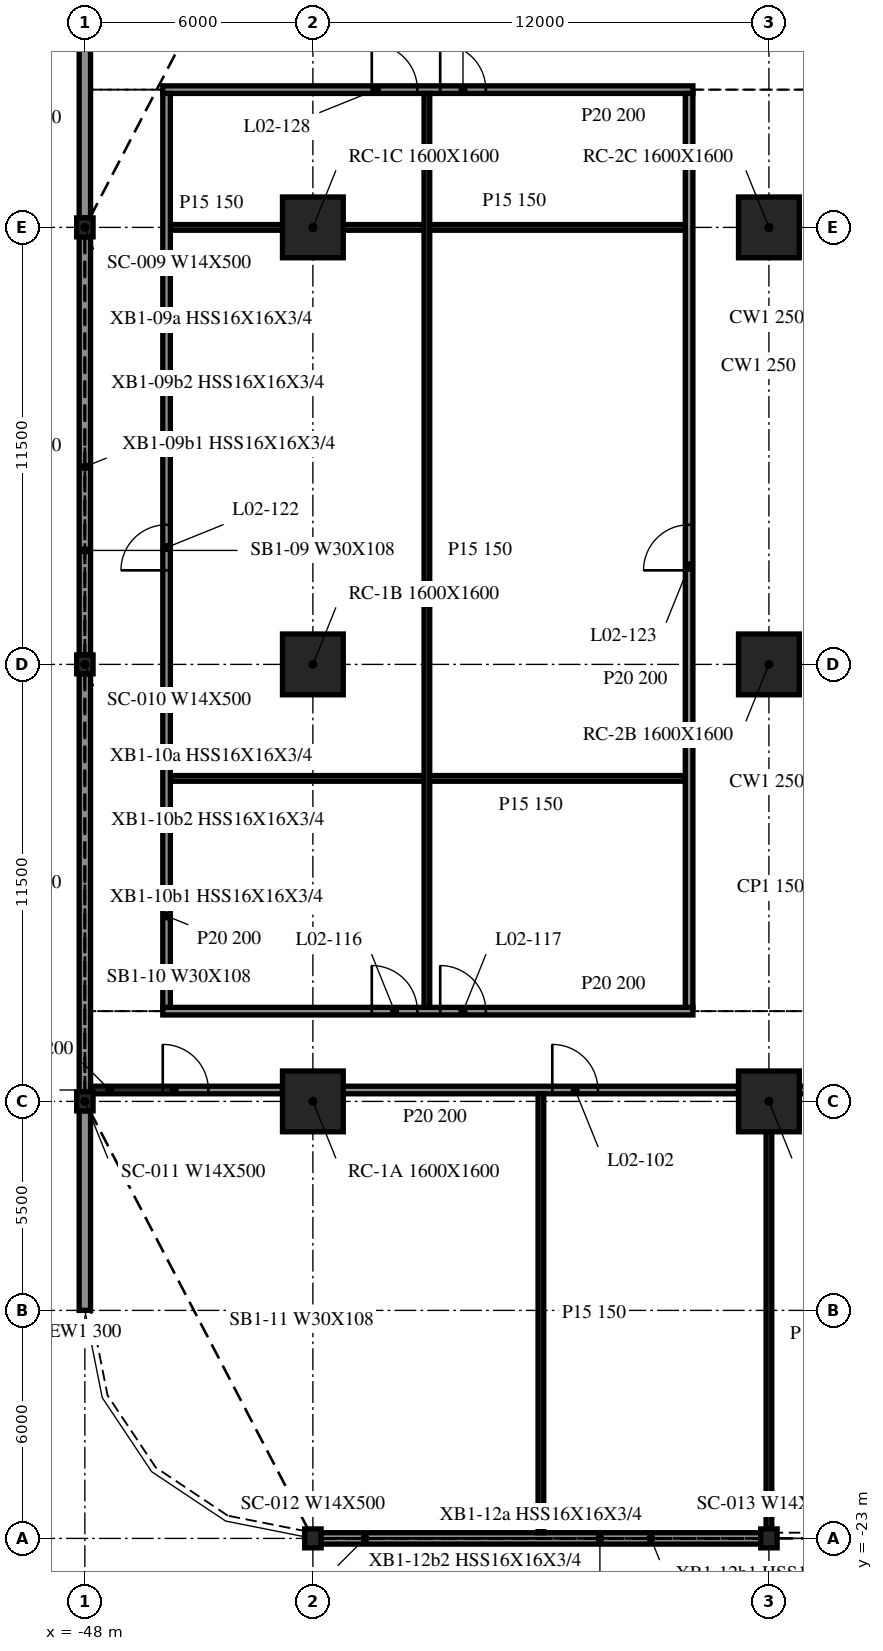
"""IFC4 building model, lengths in metres.
Left out: names, types, materials, properties, quantities, classifications, styles, units other than length and angle.
Written with IfcOpenShell. Run it as: python <this file> out.ifc"""

import sys

from ifc_helpers import new_model, si_unit, direction, frame, frame_2d, origin, origin_2d, place, context, subcontext, project, spatial, rectangle, i_section, extrude, element, fill, save


model = new_model("IFC4")
c1 = context("Model", 3, precision=1e-05, world=origin(), true_north=direction((0.0, 1.0)))
c2 = subcontext(c1, "Body", "Model", "MODEL_VIEW")
j1 = project(units=[si_unit("LENGTHUNIT", "METRE"), si_unit("PLANEANGLEUNIT", "RADIAN")], contexts=[c1])
p1 = place(None, origin())
s1 = spatial("IfcSite", under=j1, at=p1, CompositionType="ELEMENT")
p2 = place(p1, origin())
s2 = spatial("IfcBuilding", under=s1, at=p2, CompositionType="ELEMENT")
p3 = place(p2, frame((0.0, 0.0, 11.5)))
s3 = spatial("IfcBuildingStorey", under=s2, at=p3, CompositionType="ELEMENT", Elevation=11.5)
for number, where, z_axis, x_axis in (
    (1, (-42.0, -11.5, -0.34), (0.0, 0.0, 1.0), (1.0, 0.0, 0.0)),
    (2, (-42.0, 0.0, -0.34), (0.0, 0.0, 1.0), (1.0, 0.0, 0.0)),
    (3, (-42.0, 11.5, -0.34), (0.0, 0.0, 1.0), (1.0, 0.0, 0.0)),
    (4, (-30.0, -11.5, -0.34), (0.0, 0.0, 1.0), (1.0, 0.0, 0.0)),
    (5, (-30.0, 0.0, -0.34), (0.0, 0.0, 1.0), (1.0, 0.0, 0.0)),
    (6, (-30.0, 11.5, -0.34), (0.0, 0.0, 1.0), (1.0, 0.0, 0.0)),
):
    element("IfcColumn", number, at=place(p3, frame(where, z_axis=z_axis, x_axis=x_axis)), inside=s3, PredefinedType="COLUMN", context=c2, shape_type="SweptSolid", body=[
        extrude(rectangle(XDim=1.6, YDim=1.6, at=origin_2d()), origin(), (0.0, 0.0, 1.0), 4.3),
    ])
for number, where, z_axis, x_axis in (
    (7, (-48.0, 11.5, -0.34), (0.0, 0.0, 1.0), (1.0, 0.0, 0.0)),
    (8, (-48.0, 0.0, -0.34), (0.0, 0.0, 1.0), (1.0, 0.0, 0.0)),
    (9, (-48.0, -11.5, -0.34), (0.0, 0.0, 1.0), (1.0, 0.0, 0.0)),
    (10, (-42.0, -23.0, -0.34), (0.0, 0.0, 1.0), (1.0, 0.0, 0.0)),
    (11, (-30.0, -23.0, -0.34), (0.0, 0.0, 1.0), (1.0, 0.0, 0.0)),
):
    element("IfcColumn", number, at=place(p3, frame(where, z_axis=z_axis, x_axis=x_axis)), inside=s3, PredefinedType="COLUMN", context=c2, shape_type="SweptSolid", body=[
        extrude(i_section(OverallWidth=0.432, OverallDepth=0.498, WebThickness=0.056, FlangeThickness=0.089, at=origin_2d()), origin(), (0.0, 0.0, 1.0), 4.3),
    ])
p4 = place(p3, frame((-48.0, 17.0, 0.0), z_axis=(0.0, 0.0, 1.0), x_axis=(0.0, -1.0, 0.0)))
e12 = element("IfcWall", 12, at=p4, inside=s3, PredefinedType="NOTDEFINED", context=c2, shape_type="SweptSolid", body=[
    extrude(rectangle(XDim=5.251, YDim=0.3, at=frame_2d((2.625, 0.0))), origin(), (0.0, 0.0, 1.0), 3.203),
])
for number, where, z_axis, x_axis in (
    (13, (-48.0, 11.251, 0.0), (0.0, 0.0, 1.0), (0.0, -1.0, 0.0)),
    (14, (-48.0, -0.249, 0.0), (0.0, 0.0, 1.0), (0.0, -1.0, 0.0)),
):
    element("IfcWall", number, at=place(p3, frame(where, z_axis=z_axis, x_axis=x_axis)), inside=s3, PredefinedType="NOTDEFINED", context=c2, shape_type="SweptSolid", body=[
        extrude(rectangle(XDim=11.002, YDim=0.3, at=frame_2d((5.501, 0.0))), origin(), (0.0, 0.0, 1.0), 3.203),
    ])
p5 = place(p3, frame((-48.0, -11.749, 0.0), z_axis=(0.0, 0.0, 1.0), x_axis=(0.0, -1.0, 0.0)))
e15 = element("IfcWall", 15, at=p5, inside=s3, PredefinedType="NOTDEFINED", context=c2, shape_type="SweptSolid", body=[
    extrude(rectangle(XDim=5.251, YDim=0.3, at=frame_2d((2.625, 0.0))), origin(), (0.0, 0.0, 1.0), 3.203),
])
p6 = place(p3, frame((-41.972, -23.0, 0.0), z_axis=(0.0, 0.0, 1.0), x_axis=(1.0, 0.0, 0.0)))
e16 = element("IfcWall", 16, at=p6, inside=s3, PredefinedType="NOTDEFINED", context=c2, shape_type="SweptSolid", body=[
    extrude(rectangle(XDim=11.944, YDim=0.3, at=frame_2d((5.972, 0.0))), origin(), (0.0, 0.0, 1.0), 3.203),
])
p7 = place(p3, frame((-47.85, -11.2, 0.0), z_axis=(0.0, 0.0, 1.0), x_axis=(1.0, 0.0, 0.0)))
e17 = element("IfcWall", 17, at=p7, inside=s3, PredefinedType="PARTITIONING", context=c2, shape_type="SweptSolid", body=[
    extrude(rectangle(XDim=5.05, YDim=0.2, at=frame_2d((2.525, 0.0))), origin(), (0.0, 0.0, 1.0), 3.96),
])
p8 = place(p7, frame((1.9, 0.0, 0.0)))
e18 = element("IfcOpeningElement", 18, at=p8, cuts=e17, PredefinedType="OPENING", context=c2, shape_type="SweptSolid", body=[
    extrude(rectangle(XDim=1.2, YDim=2.1, at=frame_2d((0.6, 1.05))), frame((0.0, 0.11, 0.0), z_axis=(0.0, -1.0, 0.0), x_axis=(1.0, 0.0, 0.0)), (0.0, 0.0, 1.0), 0.22),
])
p9 = place(p3, frame((-41.2, -11.2, 0.0), z_axis=(0.0, 0.0, 1.0), x_axis=(1.0, 0.0, 0.0)))
e19 = element("IfcWall", 19, at=p9, inside=s3, PredefinedType="PARTITIONING", context=c2, shape_type="SweptSolid", body=[
    extrude(rectangle(XDim=10.4, YDim=0.2, at=frame_2d((5.2, 0.0))), origin(), (0.0, 0.0, 1.0), 3.96),
])
p10 = place(p9, frame((5.5, 0.0, 0.0)))
e20 = element("IfcOpeningElement", 20, at=p10, cuts=e19, PredefinedType="OPENING", context=c2, shape_type="SweptSolid", body=[
    extrude(rectangle(XDim=1.2, YDim=2.1, at=frame_2d((0.6, 1.05))), frame((0.0, 0.11, 0.0), z_axis=(0.0, -1.0, 0.0), x_axis=(1.0, 0.0, 0.0)), (0.0, 0.0, 1.0), 0.22),
])
p11 = place(p3, frame((-29.2, -11.2, 0.0), z_axis=(0.0, 0.0, 1.0), x_axis=(1.0, 0.0, 0.0)))
e21 = element("IfcWall", 21, at=p11, inside=s3, PredefinedType="PARTITIONING", context=c2, shape_type="SweptSolid", body=[
    extrude(rectangle(XDim=10.4, YDim=0.2, at=frame_2d((5.2, 0.0))), origin(), (0.0, 0.0, 1.0), 3.96),
])
p12 = place(p11, frame((3.7, 0.0, 0.0)))
e22 = element("IfcOpeningElement", 22, at=p12, cuts=e21, PredefinedType="OPENING", context=c2, shape_type="SweptSolid", body=[
    extrude(rectangle(XDim=1.2, YDim=2.1, at=frame_2d((0.6, 1.05))), frame((0.0, 0.11, 0.0), z_axis=(0.0, -1.0, 0.0), x_axis=(1.0, 0.0, 0.0)), (0.0, 0.0, 1.0), 0.22),
])
p13 = place(p11, frame((5.5, 0.0, 0.0)))
e23 = element("IfcOpeningElement", 23, at=p13, cuts=e21, PredefinedType="OPENING", context=c2, shape_type="SweptSolid", body=[
    extrude(rectangle(XDim=1.2, YDim=2.1, at=frame_2d((0.6, 1.05))), frame((0.0, 0.11, 0.0), z_axis=(0.0, -1.0, 0.0), x_axis=(1.0, 0.0, 0.0)), (0.0, 0.0, 1.0), 0.22),
])
p14 = place(p11, frame((8.5, 0.0, 0.0)))
e24 = element("IfcOpeningElement", 24, at=p14, cuts=e21, PredefinedType="OPENING", context=c2, shape_type="SweptSolid", body=[
    extrude(rectangle(XDim=1.0, YDim=2.1, at=frame_2d((0.5, 1.05))), frame((0.0, 0.11, 0.0), z_axis=(0.0, -1.0, 0.0), x_axis=(1.0, 0.0, 0.0)), (0.0, 0.0, 1.0), 0.22),
])
p15 = place(p3, frame((-45.95, -9.125, 0.0), z_axis=(0.0, 0.0, 1.0), x_axis=(1.0, 0.0, 0.0)))
e25 = element("IfcWall", 25, at=p15, inside=s3, PredefinedType="PARTITIONING", context=c2, shape_type="SweptSolid", body=[
    extrude(rectangle(XDim=13.95, YDim=0.2, at=frame_2d((6.975, 0.0))), origin(), (0.0, 0.0, 1.0), 3.96),
])
p16 = place(p15, frame((5.5, 0.0, 0.0)))
e26 = element("IfcOpeningElement", 26, at=p16, cuts=e25, PredefinedType="OPENING", context=c2, shape_type="SweptSolid", body=[
    extrude(rectangle(XDim=1.2, YDim=2.1, at=frame_2d((0.6, 1.05))), frame((0.0, 0.11, 0.0), z_axis=(0.0, -1.0, 0.0), x_axis=(1.0, 0.0, 0.0)), (0.0, 0.0, 1.0), 0.22),
])
p17 = place(p15, frame((7.3, 0.0, 0.0)))
e27 = element("IfcOpeningElement", 27, at=p17, cuts=e25, PredefinedType="OPENING", context=c2, shape_type="SweptSolid", body=[
    extrude(rectangle(XDim=1.2, YDim=2.1, at=frame_2d((0.6, 1.05))), frame((0.0, 0.11, 0.0), z_axis=(0.0, -1.0, 0.0), x_axis=(1.0, 0.0, 0.0)), (0.0, 0.0, 1.0), 0.22),
])
p18 = place(p3, frame((-45.75, -3.0, 0.0), z_axis=(0.0, 0.0, 1.0), x_axis=(1.0, 0.0, 0.0)))
e28 = element("IfcWall", 28, at=p18, inside=s3, PredefinedType="PARTITIONING", context=c2, shape_type="SweptSolid", body=[
    extrude(rectangle(XDim=13.55, YDim=0.15, at=frame_2d((6.775, 0.0))), origin(), (0.0, 0.0, 1.0), 3.96),
])
p19 = place(p3, frame((-45.75, 11.5, 0.0), z_axis=(0.0, 0.0, 1.0), x_axis=(1.0, 0.0, 0.0)))
e29 = element("IfcWall", 29, at=p19, inside=s3, PredefinedType="PARTITIONING", context=c2, shape_type="SweptSolid", body=[
    extrude(rectangle(XDim=2.95, YDim=0.15, at=frame_2d((1.475, 0.0))), origin(), (0.0, 0.0, 1.0), 3.96),
])
p20 = place(p3, frame((-41.2, 11.5, 0.0), z_axis=(0.0, 0.0, 1.0), x_axis=(1.0, 0.0, 0.0)))
e30 = element("IfcWall", 30, at=p20, inside=s3, PredefinedType="PARTITIONING", context=c2, shape_type="SweptSolid", body=[
    extrude(rectangle(XDim=9.0, YDim=0.15, at=frame_2d((4.5, 0.0))), origin(), (0.0, 0.0, 1.0), 3.96),
])
p21 = place(p3, frame((-45.95, 15.125, 0.0), z_axis=(0.0, 0.0, 1.0), x_axis=(1.0, 0.0, 0.0)))
e31 = element("IfcWall", 31, at=p21, inside=s3, PredefinedType="PARTITIONING", context=c2, shape_type="SweptSolid", body=[
    extrude(rectangle(XDim=13.95, YDim=0.2, at=frame_2d((6.975, 0.0))), origin(), (0.0, 0.0, 1.0), 3.96),
])
p22 = place(p21, frame((5.5, 0.0, 0.0)))
e32 = element("IfcOpeningElement", 32, at=p22, cuts=e31, PredefinedType="OPENING", context=c2, shape_type="SweptSolid", body=[
    extrude(rectangle(XDim=1.2, YDim=2.1, at=frame_2d((0.6, 1.05))), frame((0.0, 0.11, 0.0), z_axis=(0.0, -1.0, 0.0), x_axis=(1.0, 0.0, 0.0)), (0.0, 0.0, 1.0), 0.22),
])
p23 = place(p21, frame((7.3, 0.0, 0.0)))
e33 = element("IfcOpeningElement", 33, at=p23, cuts=e31, PredefinedType="OPENING", context=c2, shape_type="SweptSolid", body=[
    extrude(rectangle(XDim=1.2, YDim=2.1, at=frame_2d((0.6, 1.05))), frame((0.0, 0.11, 0.0), z_axis=(0.0, -1.0, 0.0), x_axis=(1.0, 0.0, 0.0)), (0.0, 0.0, 1.0), 0.22),
])
p24 = place(p3, frame((-45.85, -9.025, 0.0), z_axis=(0.0, 0.0, 1.0), x_axis=(0.0, 1.0, 0.0)))
e34 = element("IfcWall", 34, at=p24, inside=s3, PredefinedType="PARTITIONING", context=c2, shape_type="SweptSolid", body=[
    extrude(rectangle(XDim=24.05, YDim=0.2, at=frame_2d((12.025, 0.0))), origin(), (0.0, 0.0, 1.0), 3.96),
])
p25 = place(p24, frame((11.5, 0.0, 0.0)))
e35 = element("IfcOpeningElement", 35, at=p25, cuts=e34, PredefinedType="OPENING", context=c2, shape_type="SweptSolid", body=[
    extrude(rectangle(XDim=1.2, YDim=2.1, at=frame_2d((0.6, 1.05))), frame((0.0, 0.11, 0.0), z_axis=(0.0, -1.0, 0.0), x_axis=(1.0, 0.0, 0.0)), (0.0, 0.0, 1.0), 0.22),
])
p26 = place(p3, frame((-39.0, -9.025, 0.0), z_axis=(0.0, 0.0, 1.0), x_axis=(0.0, 1.0, 0.0)))
e36 = element("IfcWall", 36, at=p26, inside=s3, PredefinedType="PARTITIONING", context=c2, shape_type="SweptSolid", body=[
    extrude(rectangle(XDim=24.05, YDim=0.15, at=frame_2d((12.025, 0.0))), origin(), (0.0, 0.0, 1.0), 3.96),
])
p27 = place(p3, frame((-36.0, -22.85, 0.0), z_axis=(0.0, 0.0, 1.0), x_axis=(0.0, 1.0, 0.0)))
e37 = element("IfcWall", 37, at=p27, inside=s3, PredefinedType="PARTITIONING", context=c2, shape_type="SweptSolid", body=[
    extrude(rectangle(XDim=11.55, YDim=0.15, at=frame_2d((5.775, 0.0))), origin(), (0.0, 0.0, 1.0), 3.96),
])
p28 = place(p3, frame((-32.1, -9.025, 0.0), z_axis=(0.0, 0.0, 1.0), x_axis=(0.0, 1.0, 0.0)))
e38 = element("IfcWall", 38, at=p28, inside=s3, PredefinedType="PARTITIONING", context=c2, shape_type="SweptSolid", body=[
    extrude(rectangle(XDim=24.05, YDim=0.2, at=frame_2d((12.025, 0.0))), origin(), (0.0, 0.0, 1.0), 3.96),
])
p29 = place(p28, frame((11.5, 0.0, 0.0)))
e39 = element("IfcOpeningElement", 39, at=p29, cuts=e38, PredefinedType="OPENING", context=c2, shape_type="SweptSolid", body=[
    extrude(rectangle(XDim=1.2, YDim=2.1, at=frame_2d((0.6, 1.05))), frame((0.0, 0.11, 0.0), z_axis=(0.0, -1.0, 0.0), x_axis=(1.0, 0.0, 0.0)), (0.0, 0.0, 1.0), 0.22),
])
p30 = place(p3, frame((-30.0, -22.975, 0.0), z_axis=(0.0, 0.0, 1.0), x_axis=(0.0, 1.0, 0.0)))
e40 = element("IfcWall", 40, at=p30, inside=s3, PredefinedType="PARTITIONING", context=c2, shape_type="SweptSolid", body=[
    extrude(rectangle(XDim=10.675, YDim=0.15, at=frame_2d((5.337, 0.0))), origin(), (0.0, 0.0, 1.0), 3.96),
])
p31 = place(p8, origin())
e41 = element("IfcDoor", 41, at=p31, inside=s3, OperationType="SINGLE_SWING_RIGHT", PredefinedType="DOOR", context=c2, shape_type="SweptSolid", body=[
    extrude(rectangle(XDim=1.2, YDim=2.1, at=frame_2d((0.6, 1.05))), frame((0.0, 0.025, 0.0), z_axis=(0.0, -1.0, 0.0), x_axis=(1.0, 0.0, 0.0)), (0.0, 0.0, 1.0), 0.05),
])
fill(e18, e41)
p32 = place(p10, origin())
e42 = element("IfcDoor", 42, at=p32, inside=s3, OperationType="SINGLE_SWING_LEFT", PredefinedType="DOOR", context=c2, shape_type="SweptSolid", body=[
    extrude(rectangle(XDim=1.2, YDim=2.1, at=frame_2d((0.6, 1.05))), frame((0.0, 0.025, 0.0), z_axis=(0.0, -1.0, 0.0), x_axis=(1.0, 0.0, 0.0)), (0.0, 0.0, 1.0), 0.05),
])
fill(e20, e42)
p33 = place(p16, origin())
e43 = element("IfcDoor", 43, at=p33, inside=s3, OperationType="SINGLE_SWING_LEFT", PredefinedType="DOOR", context=c2, shape_type="SweptSolid", body=[
    extrude(rectangle(XDim=1.2, YDim=2.1, at=frame_2d((0.6, 1.05))), frame((0.0, 0.025, 0.0), z_axis=(0.0, -1.0, 0.0), x_axis=(1.0, 0.0, 0.0)), (0.0, 0.0, 1.0), 0.05),
])
fill(e26, e43)
p34 = place(p17, origin())
e44 = element("IfcDoor", 44, at=p34, inside=s3, OperationType="SINGLE_SWING_RIGHT", PredefinedType="DOOR", context=c2, shape_type="SweptSolid", body=[
    extrude(rectangle(XDim=1.2, YDim=2.1, at=frame_2d((0.6, 1.05))), frame((0.0, 0.025, 0.0), z_axis=(0.0, -1.0, 0.0), x_axis=(1.0, 0.0, 0.0)), (0.0, 0.0, 1.0), 0.05),
])
fill(e27, e44)
p35 = place(p25, origin())
e45 = element("IfcDoor", 45, at=p35, inside=s3, OperationType="SINGLE_SWING_LEFT", PredefinedType="DOOR", context=c2, shape_type="SweptSolid", body=[
    extrude(rectangle(XDim=1.2, YDim=2.1, at=frame_2d((0.6, 1.05))), frame((0.0, 0.025, 0.0), z_axis=(0.0, -1.0, 0.0), x_axis=(1.0, 0.0, 0.0)), (0.0, 0.0, 1.0), 0.05),
])
fill(e35, e45)
p36 = place(p29, origin())
e46 = element("IfcDoor", 46, at=p36, inside=s3, OperationType="SINGLE_SWING_RIGHT", PredefinedType="DOOR", context=c2, shape_type="SweptSolid", body=[
    extrude(rectangle(XDim=1.2, YDim=2.1, at=frame_2d((0.6, 1.05))), frame((0.0, 0.025, 0.0), z_axis=(0.0, -1.0, 0.0), x_axis=(1.0, 0.0, 0.0)), (0.0, 0.0, 1.0), 0.05),
])
fill(e39, e46)
p37 = place(p22, origin())
e47 = element("IfcDoor", 47, at=p37, inside=s3, OperationType="SINGLE_SWING_RIGHT", PredefinedType="DOOR", context=c2, shape_type="SweptSolid", body=[
    extrude(rectangle(XDim=1.2, YDim=2.1, at=frame_2d((0.6, 1.05))), frame((0.0, 0.025, 0.0), z_axis=(0.0, -1.0, 0.0), x_axis=(1.0, 0.0, 0.0)), (0.0, 0.0, 1.0), 0.05),
])
fill(e32, e47)
p38 = place(p23, origin())
e48 = element("IfcDoor", 48, at=p38, inside=s3, OperationType="SINGLE_SWING_LEFT", PredefinedType="DOOR", context=c2, shape_type="SweptSolid", body=[
    extrude(rectangle(XDim=1.2, YDim=2.1, at=frame_2d((0.6, 1.05))), frame((0.0, 0.025, 0.0), z_axis=(0.0, -1.0, 0.0), x_axis=(1.0, 0.0, 0.0)), (0.0, 0.0, 1.0), 0.05),
])
fill(e33, e48)
save(model, sys.argv[1])
